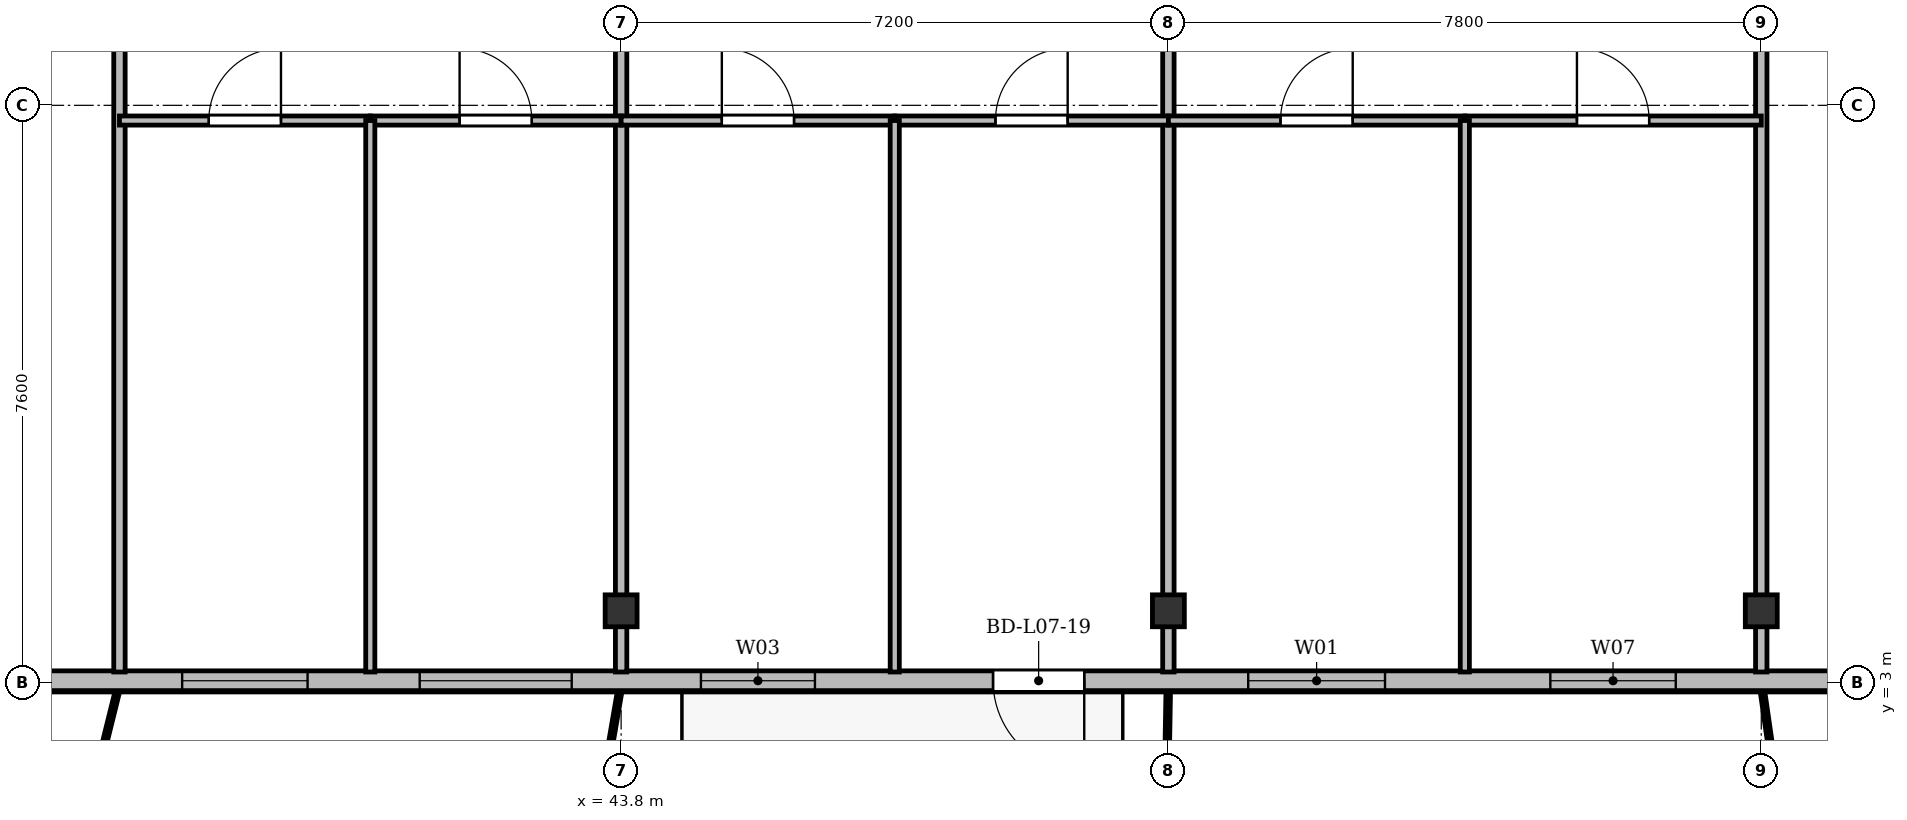
"""IFC4 building model, lengths in metres.
Left out: names, types, materials, properties, quantities, classifications, styles, units other than length and angle.
Written with IfcOpenShell. Run it as: python <this file> out.ifc"""

import sys

from ifc_helpers import new_model, si_unit, direction, frame, frame_2d, origin, origin_2d, place, context, subcontext, project, spatial, rectangle, i_section, extrude, source, transform, mapped, element, fill, save


model = new_model("IFC4")
c1 = context("Model", 3, precision=1e-05, world=origin(), true_north=direction((0.0, 1.0)))
c2 = subcontext(c1, "Body", "Model", "MODEL_VIEW")
j1 = project(units=[si_unit("LENGTHUNIT", "METRE"), si_unit("PLANEANGLEUNIT", "RADIAN")], contexts=[c1])
p1 = place(None, origin())
s1 = spatial("IfcSite", under=j1, at=p1, CompositionType="ELEMENT")
p2 = place(p1, origin())
s2 = spatial("IfcBuilding", under=s1, at=p2, CompositionType="ELEMENT")
p3 = place(p2, frame((0.0, 0.0, 30.7)))
s3 = spatial("IfcBuildingStorey", under=s2, at=p3, CompositionType="ELEMENT", Elevation=30.7)
m1 = source(origin(), c2, "Body", "SweptSolid", [
    extrude(i_section(OverallWidth=0.42, OverallDepth=0.42, WebThickness=0.026, FlangeThickness=0.04, at=origin_2d()), origin(), (0.0, 0.0, 1.0), 3.6),
])
for number, where, z_axis, x_axis in (
    (1, (43.8, 3.95, 0.0), (0.0, 0.0, 1.0), (1.0, 0.0, 0.0)),
    (2, (51.0, 3.95, 0.0), (0.0, 0.0, 1.0), (1.0, 0.0, 0.0)),
    (3, (58.8, 3.95, 0.0), (0.0, 0.0, 1.0), (1.0, 0.0, 0.0)),
):
    element("IfcColumn", number, at=place(p3, frame(where, z_axis=z_axis, x_axis=x_axis)), inside=s3, PredefinedType="COLUMN", context=c2, shape_type="MappedRepresentation", body=[
        mapped(m1, transform((0.0, 0.0, 0.0), x_axis=(1.0, 0.0, 0.0), y_axis=(0.0, 1.0, 0.0), z_axis=(0.0, 0.0, 1.0), scale=1.0)),
    ])
p4 = place(p3, frame((66.9, 3.03, 0.0), z_axis=(0.0, 0.0, 1.0), x_axis=(-1.0, 0.0, 0.0)))
e4 = element("IfcWall", 4, at=p4, inside=s3, PredefinedType="SOLIDWALL", context=c2, shape_type="SweptSolid", body=[
    extrude(rectangle(XDim=59.4, YDim=0.26, at=frame_2d((29.7, 0.0))), origin(), (0.0, 0.0, 1.0), 3.34),
])
p5 = place(p4, frame((3.7, 0.0, 0.9)))
e5 = element("IfcOpeningElement", 5, at=p5, cuts=e4, PredefinedType="OPENING", context=c2, shape_type="SweptSolid", body=[
    extrude(rectangle(XDim=2.0, YDim=1.95, at=frame_2d((1.0, 0.975))), frame((0.0, 0.14, 0.0), z_axis=(0.0, -1.0, 0.0), x_axis=(1.0, 0.0, 0.0)), (0.0, 0.0, 1.0), 0.28),
])
p6 = place(p4, frame((9.225, 0.0, 0.9)))
e6 = element("IfcOpeningElement", 6, at=p6, cuts=e4, PredefinedType="OPENING", context=c2, shape_type="SweptSolid", body=[
    extrude(rectangle(XDim=1.65, YDim=1.85, at=frame_2d((0.825, 0.925))), frame((0.0, 0.14, 0.0), z_axis=(0.0, -1.0, 0.0), x_axis=(1.0, 0.0, 0.0)), (0.0, 0.0, 1.0), 0.28),
])
p7 = place(p4, frame((13.05, 0.0, 0.9)))
e7 = element("IfcOpeningElement", 7, at=p7, cuts=e4, PredefinedType="OPENING", context=c2, shape_type="SweptSolid", body=[
    extrude(rectangle(XDim=1.8, YDim=1.8, at=frame_2d((0.9, 0.9))), frame((0.0, 0.14, 0.0), z_axis=(0.0, -1.0, 0.0), x_axis=(1.0, 0.0, 0.0)), (0.0, 0.0, 1.0), 0.28),
])
p8 = place(p4, frame((17.007, 0.0, 0.0)))
e8 = element("IfcOpeningElement", 8, at=p8, cuts=e4, PredefinedType="OPENING", context=c2, shape_type="SweptSolid", body=[
    extrude(rectangle(XDim=1.2, YDim=2.2, at=frame_2d((0.6, 1.1))), frame((0.0, 0.14, 0.0), z_axis=(0.0, -1.0, 0.0), x_axis=(1.0, 0.0, 0.0)), (0.0, 0.0, 1.0), 0.28),
])
p9 = place(p4, frame((20.55, 0.0, 0.9)))
e9 = element("IfcOpeningElement", 9, at=p9, cuts=e4, PredefinedType="OPENING", context=c2, shape_type="SweptSolid", body=[
    extrude(rectangle(XDim=1.5, YDim=1.75, at=frame_2d((0.75, 0.875))), frame((0.0, 0.14, 0.0), z_axis=(0.0, -1.0, 0.0), x_axis=(1.0, 0.0, 0.0)), (0.0, 0.0, 1.0), 0.28),
])
p10 = place(p4, frame((23.75, 0.0, 0.9)))
e10 = element("IfcOpeningElement", 10, at=p10, cuts=e4, PredefinedType="OPENING", context=c2, shape_type="SweptSolid", body=[
    extrude(rectangle(XDim=2.0, YDim=1.95, at=frame_2d((1.0, 0.975))), frame((0.0, 0.14, 0.0), z_axis=(0.0, -1.0, 0.0), x_axis=(1.0, 0.0, 0.0)), (0.0, 0.0, 1.0), 0.28),
])
p11 = place(p4, frame((27.225, 0.0, 0.9)))
e11 = element("IfcOpeningElement", 11, at=p11, cuts=e4, PredefinedType="OPENING", context=c2, shape_type="SweptSolid", body=[
    extrude(rectangle(XDim=1.65, YDim=1.85, at=frame_2d((0.825, 0.925))), frame((0.0, 0.14, 0.0), z_axis=(0.0, -1.0, 0.0), x_axis=(1.0, 0.0, 0.0)), (0.0, 0.0, 1.0), 0.28),
])
p12 = place(p4, frame((32.1, 0.0, 0.9)))
e12 = element("IfcOpeningElement", 12, at=p12, cuts=e4, PredefinedType="OPENING", context=c2, shape_type="SweptSolid", body=[
    extrude(rectangle(XDim=1.8, YDim=1.8, at=frame_2d((0.9, 0.9))), frame((0.0, 0.14, 0.0), z_axis=(0.0, -1.0, 0.0), x_axis=(1.0, 0.0, 0.0)), (0.0, 0.0, 1.0), 0.28),
])
p13 = place(p4, frame((36.75, 0.0, 0.9)))
e13 = element("IfcOpeningElement", 13, at=p13, cuts=e4, PredefinedType="OPENING", context=c2, shape_type="SweptSolid", body=[
    extrude(rectangle(XDim=1.5, YDim=1.75, at=frame_2d((0.75, 0.875))), frame((0.0, 0.14, 0.0), z_axis=(0.0, -1.0, 0.0), x_axis=(1.0, 0.0, 0.0)), (0.0, 0.0, 1.0), 0.28),
])
p14 = place(p4, frame((39.15, 0.0, 0.9)))
e14 = element("IfcOpeningElement", 14, at=p14, cuts=e4, PredefinedType="OPENING", context=c2, shape_type="SweptSolid", body=[
    extrude(rectangle(XDim=1.5, YDim=1.75, at=frame_2d((0.75, 0.875))), frame((0.0, 0.14, 0.0), z_axis=(0.0, -1.0, 0.0), x_axis=(1.0, 0.0, 0.0)), (0.0, 0.0, 1.0), 0.28),
])
p15 = place(p4, frame((41.3, 0.0, 0.9)))
e15 = element("IfcOpeningElement", 15, at=p15, cuts=e4, PredefinedType="OPENING", context=c2, shape_type="SweptSolid", body=[
    extrude(rectangle(XDim=2.0, YDim=1.95, at=frame_2d((1.0, 0.975))), frame((0.0, 0.14, 0.0), z_axis=(0.0, -1.0, 0.0), x_axis=(1.0, 0.0, 0.0)), (0.0, 0.0, 1.0), 0.28),
])
p16 = place(p4, frame((45.435, 0.0, 0.0)))
e16 = element("IfcOpeningElement", 16, at=p16, cuts=e4, PredefinedType="OPENING", context=c2, shape_type="SweptSolid", body=[
    extrude(rectangle(XDim=1.2, YDim=2.2, at=frame_2d((0.6, 1.1))), frame((0.0, 0.14, 0.0), z_axis=(0.0, -1.0, 0.0), x_axis=(1.0, 0.0, 0.0)), (0.0, 0.0, 1.0), 0.28),
])
p17 = place(p4, frame((48.45, 0.0, 0.9)))
e17 = element("IfcOpeningElement", 17, at=p17, cuts=e4, PredefinedType="OPENING", context=c2, shape_type="SweptSolid", body=[
    extrude(rectangle(XDim=1.8, YDim=1.8, at=frame_2d((0.9, 0.9))), frame((0.0, 0.14, 0.0), z_axis=(0.0, -1.0, 0.0), x_axis=(1.0, 0.0, 0.0)), (0.0, 0.0, 1.0), 0.28),
])
p18 = place(p4, frame((51.9, 0.0, 0.9)))
e18 = element("IfcOpeningElement", 18, at=p18, cuts=e4, PredefinedType="OPENING", context=c2, shape_type="SweptSolid", body=[
    extrude(rectangle(XDim=2.2, YDim=1.8, at=frame_2d((1.1, 0.9))), frame((0.0, 0.14, 0.0), z_axis=(0.0, -1.0, 0.0), x_axis=(1.0, 0.0, 0.0)), (0.0, 0.0, 1.0), 0.28),
])
p19 = place(p4, frame((55.65, 0.0, 0.9)))
e19 = element("IfcOpeningElement", 19, at=p19, cuts=e4, PredefinedType="OPENING", context=c2, shape_type="SweptSolid", body=[
    extrude(rectangle(XDim=1.5, YDim=1.75, at=frame_2d((0.75, 0.875))), frame((0.0, 0.14, 0.0), z_axis=(0.0, -1.0, 0.0), x_axis=(1.0, 0.0, 0.0)), (0.0, 0.0, 1.0), 0.28),
])
p20 = place(p3, frame((37.2, 3.145, 0.0), z_axis=(0.0, 0.0, 1.0), x_axis=(0.0, 1.0, 0.0)))
e20 = element("IfcWall", 20, at=p20, inside=s3, PredefinedType="PARTITIONING", context=c2, shape_type="SweptSolid", body=[
    extrude(rectangle(XDim=24.455, YDim=0.15, at=frame_2d((12.228, 0.0))), origin(), (0.0, 0.0, 1.0), 2.69),
])
for number, where, z_axis, x_axis in (
    (21, (43.8, 3.145, 0.0), (0.0, 0.0, 1.0), (0.0, 1.0, 0.0)),
    (22, (51.0, 3.145, 0.0), (0.0, 0.0, 1.0), (0.0, 1.0, 0.0)),
    (23, (58.8, 3.145, 0.0), (0.0, 0.0, 1.0), (0.0, 1.0, 0.0)),
):
    element("IfcWall", number, at=place(p3, frame(where, z_axis=z_axis, x_axis=x_axis)), inside=s3, PredefinedType="PARTITIONING", context=c2, shape_type="SweptSolid", body=[
        extrude(rectangle(XDim=24.455, YDim=0.15, at=frame_2d((12.228, 0.0))), origin(), (0.0, 0.0, 1.0), 2.752),
    ])
p21 = place(p3, frame((37.2, 10.4, 0.0), z_axis=(0.0, 0.0, 1.0), x_axis=(1.0, 0.0, 0.0)))
e24 = element("IfcWall", 24, at=p21, inside=s3, PredefinedType="PARTITIONING", context=c2, shape_type="SweptSolid", body=[
    extrude(rectangle(XDim=3.3, YDim=0.12, at=frame_2d((1.65, 0.0))), origin(), (0.0, 0.0, 1.0), 3.34),
])
p22 = place(p21, frame((1.175, 0.0, 0.0)))
e25 = element("IfcOpeningElement", 25, at=p22, cuts=e24, PredefinedType="OPENING", context=c2, shape_type="SweptSolid", body=[
    extrude(rectangle(XDim=0.95, YDim=2.15, at=frame_2d((0.475, 1.075))), frame((0.0, 0.07, 0.0), z_axis=(0.0, -1.0, 0.0), x_axis=(1.0, 0.0, 0.0)), (0.0, 0.0, 1.0), 0.14),
])
p23 = place(p3, frame((40.5, 10.4, 0.0), z_axis=(0.0, 0.0, 1.0), x_axis=(1.0, 0.0, 0.0)))
e26 = element("IfcWall", 26, at=p23, inside=s3, PredefinedType="PARTITIONING", context=c2, shape_type="SweptSolid", body=[
    extrude(rectangle(XDim=3.3, YDim=0.12, at=frame_2d((1.65, 0.0))), origin(), (0.0, 0.0, 1.0), 2.752),
])
p24 = place(p23, frame((1.175, 0.0, 0.0)))
e27 = element("IfcOpeningElement", 27, at=p24, cuts=e26, PredefinedType="OPENING", context=c2, shape_type="SweptSolid", body=[
    extrude(rectangle(XDim=0.95, YDim=2.15, at=frame_2d((0.475, 1.075))), frame((0.0, 0.07, 0.0), z_axis=(0.0, -1.0, 0.0), x_axis=(1.0, 0.0, 0.0)), (0.0, 0.0, 1.0), 0.14),
])
p25 = place(p3, frame((40.5, 3.145, 0.0), z_axis=(0.0, 0.0, 1.0), x_axis=(0.0, 1.0, 0.0)))
e28 = element("IfcWall", 28, at=p25, inside=s3, PredefinedType="PARTITIONING", context=c2, shape_type="SweptSolid", body=[
    extrude(rectangle(XDim=7.255, YDim=0.12, at=frame_2d((3.627, 0.0))), origin(), (0.0, 0.0, 1.0), 2.69),
])
p26 = place(p3, frame((43.8, 10.4, 0.0), z_axis=(0.0, 0.0, 1.0), x_axis=(1.0, 0.0, 0.0)))
e29 = element("IfcWall", 29, at=p26, inside=s3, PredefinedType="PARTITIONING", context=c2, shape_type="SweptSolid", body=[
    extrude(rectangle(XDim=3.6, YDim=0.12, at=frame_2d((1.8, 0.0))), origin(), (0.0, 0.0, 1.0), 2.752),
])
p27 = place(p26, frame((1.325, 0.0, 0.0)))
e30 = element("IfcOpeningElement", 30, at=p27, cuts=e29, PredefinedType="OPENING", context=c2, shape_type="SweptSolid", body=[
    extrude(rectangle(XDim=0.95, YDim=2.15, at=frame_2d((0.475, 1.075))), frame((0.0, 0.07, 0.0), z_axis=(0.0, -1.0, 0.0), x_axis=(1.0, 0.0, 0.0)), (0.0, 0.0, 1.0), 0.14),
])
p28 = place(p3, frame((47.4, 10.4, 0.0), z_axis=(0.0, 0.0, 1.0), x_axis=(1.0, 0.0, 0.0)))
e31 = element("IfcWall", 31, at=p28, inside=s3, PredefinedType="PARTITIONING", context=c2, shape_type="SweptSolid", body=[
    extrude(rectangle(XDim=3.6, YDim=0.12, at=frame_2d((1.8, 0.0))), origin(), (0.0, 0.0, 1.0), 2.752),
])
p29 = place(p28, frame((1.325, 0.0, 0.0)))
e32 = element("IfcOpeningElement", 32, at=p29, cuts=e31, PredefinedType="OPENING", context=c2, shape_type="SweptSolid", body=[
    extrude(rectangle(XDim=0.95, YDim=2.15, at=frame_2d((0.475, 1.075))), frame((0.0, 0.07, 0.0), z_axis=(0.0, -1.0, 0.0), x_axis=(1.0, 0.0, 0.0)), (0.0, 0.0, 1.0), 0.14),
])
p30 = place(p3, frame((47.4, 3.145, 0.0), z_axis=(0.0, 0.0, 1.0), x_axis=(0.0, 1.0, 0.0)))
e33 = element("IfcWall", 33, at=p30, inside=s3, PredefinedType="PARTITIONING", context=c2, shape_type="SweptSolid", body=[
    extrude(rectangle(XDim=7.255, YDim=0.12, at=frame_2d((3.627, 0.0))), origin(), (0.0, 0.0, 1.0), 2.69),
])
p31 = place(p3, frame((51.0, 10.4, 0.0), z_axis=(0.0, 0.0, 1.0), x_axis=(1.0, 0.0, 0.0)))
e34 = element("IfcWall", 34, at=p31, inside=s3, PredefinedType="PARTITIONING", context=c2, shape_type="SweptSolid", body=[
    extrude(rectangle(XDim=3.9, YDim=0.12, at=frame_2d((1.95, 0.0))), origin(), (0.0, 0.0, 1.0), 2.752),
])
p32 = place(p31, frame((1.475, 0.0, 0.0)))
e35 = element("IfcOpeningElement", 35, at=p32, cuts=e34, PredefinedType="OPENING", context=c2, shape_type="SweptSolid", body=[
    extrude(rectangle(XDim=0.95, YDim=2.15, at=frame_2d((0.475, 1.075))), frame((0.0, 0.07, 0.0), z_axis=(0.0, -1.0, 0.0), x_axis=(1.0, 0.0, 0.0)), (0.0, 0.0, 1.0), 0.14),
])
p33 = place(p3, frame((54.9, 10.4, 0.0), z_axis=(0.0, 0.0, 1.0), x_axis=(1.0, 0.0, 0.0)))
e36 = element("IfcWall", 36, at=p33, inside=s3, PredefinedType="PARTITIONING", context=c2, shape_type="SweptSolid", body=[
    extrude(rectangle(XDim=3.9, YDim=0.12, at=frame_2d((1.95, 0.0))), origin(), (0.0, 0.0, 1.0), 2.752),
])
p34 = place(p33, frame((1.475, 0.0, 0.0)))
e37 = element("IfcOpeningElement", 37, at=p34, cuts=e36, PredefinedType="OPENING", context=c2, shape_type="SweptSolid", body=[
    extrude(rectangle(XDim=0.95, YDim=2.15, at=frame_2d((0.475, 1.075))), frame((0.0, 0.07, 0.0), z_axis=(0.0, -1.0, 0.0), x_axis=(1.0, 0.0, 0.0)), (0.0, 0.0, 1.0), 0.14),
])
p35 = place(p3, frame((54.9, 3.145, 0.0), z_axis=(0.0, 0.0, 1.0), x_axis=(0.0, 1.0, 0.0)))
e38 = element("IfcWall", 38, at=p35, inside=s3, PredefinedType="PARTITIONING", context=c2, shape_type="SweptSolid", body=[
    extrude(rectangle(XDim=7.255, YDim=0.12, at=frame_2d((3.627, 0.0))), origin(), (0.0, 0.0, 1.0), 2.69),
])
m2 = source(origin(), c2, "Body", "SweptSolid", [
    extrude(rectangle(XDim=1.65, YDim=1.85, at=frame_2d((0.825, 0.925))), frame((0.0, 0.03, 0.0), z_axis=(0.0, -1.0, 0.0), x_axis=(1.0, 0.0, 0.0)), (0.0, 0.0, 1.0), 0.06),
])
p36 = place(p6, origin())
e39 = element("IfcWindow", 39, at=p36, inside=s3, PartitioningType="SINGLE_PANEL", PredefinedType="WINDOW", context=c2, shape_type="MappedRepresentation", body=[
    mapped(m2, transform((0.0, 0.0, 0.0), x_axis=(1.0, 0.0, 0.0), y_axis=(0.0, 1.0, 0.0), z_axis=(0.0, 0.0, 1.0), scale=1.0)),
])
fill(e6, e39)
m3 = source(origin(), c2, "Body", "SweptSolid", [
    extrude(rectangle(XDim=1.8, YDim=1.8, at=frame_2d((0.9, 0.9))), frame((0.0, 0.03, 0.0), z_axis=(0.0, -1.0, 0.0), x_axis=(1.0, 0.0, 0.0)), (0.0, 0.0, 1.0), 0.06),
])
p37 = place(p7, origin())
e40 = element("IfcWindow", 40, at=p37, inside=s3, PartitioningType="SINGLE_PANEL", PredefinedType="WINDOW", context=c2, shape_type="MappedRepresentation", body=[
    mapped(m3, transform((0.0, 0.0, 0.0), x_axis=(1.0, 0.0, 0.0), y_axis=(0.0, 1.0, 0.0), z_axis=(0.0, 0.0, 1.0), scale=1.0)),
])
fill(e7, e40)
m4 = source(origin(), c2, "Body", "SweptSolid", [
    extrude(rectangle(XDim=1.2, YDim=2.2, at=frame_2d((0.6, 1.1))), frame((0.0, 0.025, 0.0), z_axis=(0.0, -1.0, 0.0), x_axis=(1.0, 0.0, 0.0)), (0.0, 0.0, 1.0), 0.05),
])
p38 = place(p8, origin())
e41 = element("IfcDoor", 41, at=p38, inside=s3, OperationType="SINGLE_SWING_LEFT", PredefinedType="DOOR", context=c2, shape_type="MappedRepresentation", body=[
    mapped(m4, transform((0.0, 0.0, 0.0), x_axis=(1.0, 0.0, 0.0), y_axis=(0.0, 1.0, 0.0), z_axis=(0.0, 0.0, 1.0), scale=1.0)),
])
fill(e8, e41)
m5 = source(origin(), c2, "Body", "SweptSolid", [
    extrude(rectangle(XDim=1.5, YDim=1.75, at=frame_2d((0.75, 0.875))), frame((0.0, 0.03, 0.0), z_axis=(0.0, -1.0, 0.0), x_axis=(1.0, 0.0, 0.0)), (0.0, 0.0, 1.0), 0.06),
])
p39 = place(p9, origin())
e42 = element("IfcWindow", 42, at=p39, inside=s3, PartitioningType="SINGLE_PANEL", PredefinedType="WINDOW", context=c2, shape_type="MappedRepresentation", body=[
    mapped(m5, transform((0.0, 0.0, 0.0), x_axis=(1.0, 0.0, 0.0), y_axis=(0.0, 1.0, 0.0), z_axis=(0.0, 0.0, 1.0), scale=1.0)),
])
fill(e9, e42)
m6 = source(origin(), c2, "Body", "SweptSolid", [
    extrude(rectangle(XDim=2.0, YDim=1.95, at=frame_2d((1.0, 0.975))), frame((0.0, 0.03, 0.0), z_axis=(0.0, -1.0, 0.0), x_axis=(1.0, 0.0, 0.0)), (0.0, 0.0, 1.0), 0.06),
])
p40 = place(p10, origin())
e43 = element("IfcWindow", 43, at=p40, inside=s3, PartitioningType="SINGLE_PANEL", PredefinedType="WINDOW", context=c2, shape_type="MappedRepresentation", body=[
    mapped(m6, transform((0.0, 0.0, 0.0), x_axis=(1.0, 0.0, 0.0), y_axis=(0.0, 1.0, 0.0), z_axis=(0.0, 0.0, 1.0), scale=1.0)),
])
fill(e10, e43)
p41 = place(p11, origin())
e44 = element("IfcWindow", 44, at=p41, inside=s3, PartitioningType="SINGLE_PANEL", PredefinedType="WINDOW", context=c2, shape_type="MappedRepresentation", body=[
    mapped(m2, transform((0.0, 0.0, 0.0), x_axis=(1.0, 0.0, 0.0), y_axis=(0.0, 1.0, 0.0), z_axis=(0.0, 0.0, 1.0), scale=1.0)),
])
fill(e11, e44)
m7 = source(origin(), c2, "Body", "SweptSolid", [
    extrude(rectangle(XDim=0.95, YDim=2.15, at=frame_2d((0.475, 1.075))), frame((0.0, 0.025, 0.0), z_axis=(0.0, -1.0, 0.0), x_axis=(1.0, 0.0, 0.0)), (0.0, 0.0, 1.0), 0.05),
])
p42 = place(p22, origin())
e45 = element("IfcDoor", 45, at=p42, inside=s3, OperationType="SINGLE_SWING_RIGHT", PredefinedType="DOOR", context=c2, shape_type="MappedRepresentation", body=[
    mapped(m7, transform((0.0, 0.0, 0.0), x_axis=(1.0, 0.0, 0.0), y_axis=(0.0, 1.0, 0.0), z_axis=(0.0, 0.0, 1.0), scale=1.0)),
])
fill(e25, e45)
p43 = place(p24, origin())
e46 = element("IfcDoor", 46, at=p43, inside=s3, OperationType="SINGLE_SWING_LEFT", PredefinedType="DOOR", context=c2, shape_type="MappedRepresentation", body=[
    mapped(m7, transform((0.0, 0.0, 0.0), x_axis=(1.0, 0.0, 0.0), y_axis=(0.0, 1.0, 0.0), z_axis=(0.0, 0.0, 1.0), scale=1.0)),
])
fill(e27, e46)
p44 = place(p27, origin())
e47 = element("IfcDoor", 47, at=p44, inside=s3, OperationType="SINGLE_SWING_LEFT", PredefinedType="DOOR", context=c2, shape_type="MappedRepresentation", body=[
    mapped(m7, transform((0.0, 0.0, 0.0), x_axis=(1.0, 0.0, 0.0), y_axis=(0.0, 1.0, 0.0), z_axis=(0.0, 0.0, 1.0), scale=1.0)),
])
fill(e30, e47)
p45 = place(p29, origin())
e48 = element("IfcDoor", 48, at=p45, inside=s3, OperationType="SINGLE_SWING_RIGHT", PredefinedType="DOOR", context=c2, shape_type="MappedRepresentation", body=[
    mapped(m7, transform((0.0, 0.0, 0.0), x_axis=(1.0, 0.0, 0.0), y_axis=(0.0, 1.0, 0.0), z_axis=(0.0, 0.0, 1.0), scale=1.0)),
])
fill(e32, e48)
p46 = place(p32, origin())
e49 = element("IfcDoor", 49, at=p46, inside=s3, OperationType="SINGLE_SWING_RIGHT", PredefinedType="DOOR", context=c2, shape_type="MappedRepresentation", body=[
    mapped(m7, transform((0.0, 0.0, 0.0), x_axis=(1.0, 0.0, 0.0), y_axis=(0.0, 1.0, 0.0), z_axis=(0.0, 0.0, 1.0), scale=1.0)),
])
fill(e35, e49)
p47 = place(p34, origin())
e50 = element("IfcDoor", 50, at=p47, inside=s3, OperationType="SINGLE_SWING_LEFT", PredefinedType="DOOR", context=c2, shape_type="MappedRepresentation", body=[
    mapped(m7, transform((0.0, 0.0, 0.0), x_axis=(1.0, 0.0, 0.0), y_axis=(0.0, 1.0, 0.0), z_axis=(0.0, 0.0, 1.0), scale=1.0)),
])
fill(e37, e50)
save(model, sys.argv[1])
